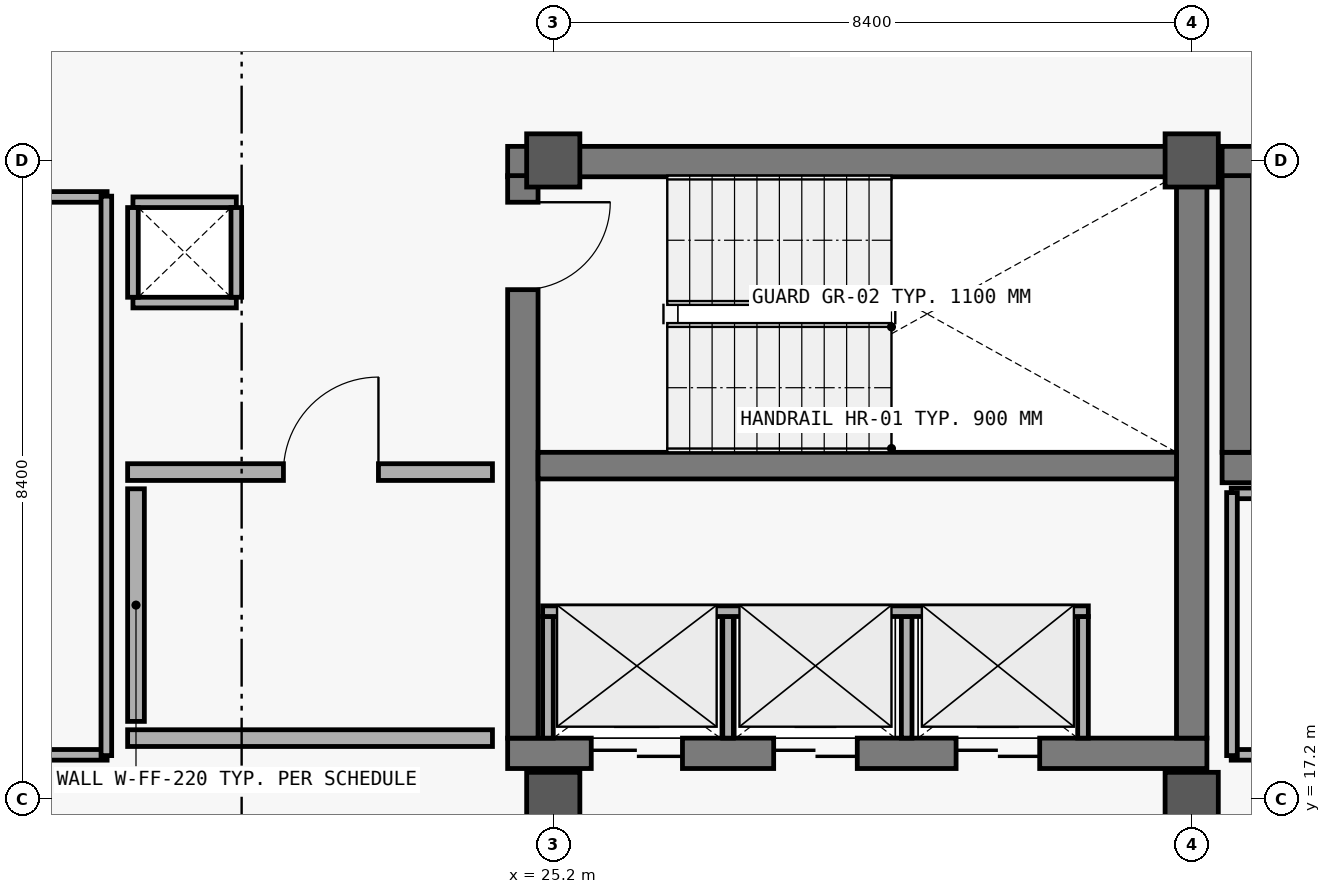
"""IFC4 building model, lengths in metres.
Left out: names, types, materials, properties, quantities, classifications, styles, units other than length and angle.
Written with IfcOpenShell. Run it as: python <this file> out.ifc"""

import sys

from ifc_helpers import new_model, si_unit, direction, frame, frame_2d, origin, origin_2d, place, context, subcontext, project, spatial, rectangle, extrude, element, fill, save


model = new_model("IFC4")
c1 = context("Model", 3, precision=1e-05, world=origin(), true_north=direction((0.0, 1.0)))
c2 = subcontext(c1, "Body", "Model", "MODEL_VIEW")
j1 = project(units=[si_unit("LENGTHUNIT", "METRE"), si_unit("PLANEANGLEUNIT", "RADIAN")], contexts=[c1])
p1 = place(None, origin())
s1 = spatial("IfcSite", under=j1, at=p1, CompositionType="ELEMENT")
p2 = place(p1, origin())
s2 = spatial("IfcBuilding", under=s1, at=p2, CompositionType="ELEMENT")
p3 = place(p2, frame((0.0, 0.0, 30.0)))
s3 = spatial("IfcBuildingStorey", under=s2, at=p3, CompositionType="ELEMENT", Elevation=30.0)
for number, where, z_axis, x_axis in (
    (1, (25.2, 17.2, 0.0), (0.0, 0.0, 1.0), (1.0, 0.0, 0.0)),
    (2, (25.2, 25.6, 0.0), (0.0, 0.0, 1.0), (1.0, 0.0, 0.0)),
    (3, (33.6, 17.2, 0.0), (0.0, 0.0, 1.0), (1.0, 0.0, 0.0)),
    (4, (33.6, 25.6, 0.0), (0.0, 0.0, 1.0), (1.0, 0.0, 0.0)),
):
    element("IfcColumn", number, at=place(p3, frame(where, z_axis=z_axis, x_axis=x_axis)), inside=s3, PredefinedType="COLUMN", context=c2, shape_type="SweptSolid", body=[
        extrude(rectangle(XDim=0.7, YDim=0.7, at=origin_2d()), origin(), (0.0, 0.0, 1.0), 3.6),
    ])
p4 = place(p3, frame((24.6, 17.8, 0.0), z_axis=(0.0, 0.0, 1.0), x_axis=(1.0, 0.0, 0.0)))
e5 = element("IfcWall", 5, at=p4, inside=s3, PredefinedType="SHEAR", context=c2, shape_type="SweptSolid", body=[
    extrude(rectangle(XDim=9.2, YDim=0.4, at=frame_2d((4.6, 0.0))), origin(), (0.0, 0.0, 1.0), 3.32),
])
p5 = place(p4, frame((1.1, 0.0, 0.0)))
e6 = element("IfcOpeningElement", 6, at=p5, cuts=e5, PredefinedType="OPENING", context=c2, shape_type="SweptSolid", body=[
    extrude(rectangle(XDim=1.2, YDim=2.2, at=frame_2d((0.6, 1.1))), frame((0.0, 0.21, 0.0), z_axis=(0.0, -1.0, 0.0), x_axis=(1.0, 0.0, 0.0)), (0.0, 0.0, 1.0), 0.42),
])
p6 = place(p4, frame((3.5, 0.0, 0.0)))
e7 = element("IfcOpeningElement", 7, at=p6, cuts=e5, PredefinedType="OPENING", context=c2, shape_type="SweptSolid", body=[
    extrude(rectangle(XDim=1.1, YDim=2.2, at=frame_2d((0.55, 1.1))), frame((0.0, 0.21, 0.0), z_axis=(0.0, -1.0, 0.0), x_axis=(1.0, 0.0, 0.0)), (0.0, 0.0, 1.0), 0.42),
])
p7 = place(p4, frame((5.9, 0.0, 0.0)))
e8 = element("IfcOpeningElement", 8, at=p7, cuts=e5, PredefinedType="OPENING", context=c2, shape_type="SweptSolid", body=[
    extrude(rectangle(XDim=1.1, YDim=2.2, at=frame_2d((0.55, 1.1))), frame((0.0, 0.21, 0.0), z_axis=(0.0, -1.0, 0.0), x_axis=(1.0, 0.0, 0.0)), (0.0, 0.0, 1.0), 0.42),
])
p8 = place(p3, frame((33.8, 25.585, 0.0), z_axis=(0.0, 0.0, 1.0), x_axis=(-1.0, 0.0, 0.0)))
e9 = element("IfcWall", 9, at=p8, inside=s3, PredefinedType="SHEAR", context=c2, shape_type="SweptSolid", body=[
    extrude(rectangle(XDim=9.2, YDim=0.4, at=frame_2d((4.6, 0.0))), origin(), (0.0, 0.0, 1.0), 3.32),
])
p9 = place(p3, frame((24.8, 25.4, 0.0), z_axis=(0.0, 0.0, 1.0), x_axis=(0.0, -1.0, 0.0)))
e10 = element("IfcWall", 10, at=p9, inside=s3, PredefinedType="SHEAR", context=c2, shape_type="SweptSolid", body=[
    extrude(rectangle(XDim=7.4, YDim=0.4, at=frame_2d((3.7, 0.0))), origin(), (0.0, 0.0, 1.0), 3.32),
])
p10 = place(p9, frame((0.35, 0.0, 0.0)))
e11 = element("IfcOpeningElement", 11, at=p10, cuts=e10, PredefinedType="OPENING", context=c2, shape_type="SweptSolid", body=[
    extrude(rectangle(XDim=1.15, YDim=2.2, at=frame_2d((0.575, 1.1))), frame((0.0, 0.21, 0.0), z_axis=(0.0, -1.0, 0.0), x_axis=(1.0, 0.0, 0.0)), (0.0, 0.0, 1.0), 0.42),
])
p11 = place(p3, frame((33.6, 18.0, 0.0), z_axis=(0.0, 0.0, 1.0), x_axis=(0.0, 1.0, 0.0)))
e12 = element("IfcWall", 12, at=p11, inside=s3, PredefinedType="SHEAR", context=c2, shape_type="SweptSolid", body=[
    extrude(rectangle(XDim=7.4, YDim=0.4, at=frame_2d((3.7, 0.0))), origin(), (0.0, 0.0, 1.0), 3.32),
])
p12 = place(p3, frame((25.0, 21.585, 0.0), z_axis=(0.0, 0.0, 1.0), x_axis=(1.0, 0.0, 0.0)))
e13 = element("IfcWall", 13, at=p12, inside=s3, PredefinedType="SHEAR", context=c2, shape_type="SweptSolid", body=[
    extrude(rectangle(XDim=8.4, YDim=0.35, at=frame_2d((4.2, 0.0))), origin(), (0.0, 0.0, 1.0), 3.32),
])
for number, where, z_axis, x_axis in (
    (14, (25.13, 18.0, 0.0), (0.0, 0.0, 1.0), (0.0, 1.0, 0.0)),
    (15, (27.5, 18.0, 0.0), (0.0, 0.0, 1.0), (0.0, 1.0, 0.0)),
    (16, (29.85, 18.0, 0.0), (0.0, 0.0, 1.0), (0.0, 1.0, 0.0)),
    (17, (32.17, 18.0, 0.0), (0.0, 0.0, 1.0), (0.0, 1.0, 0.0)),
):
    element("IfcWall", number, at=place(p3, frame(where, z_axis=z_axis, x_axis=x_axis)), inside=s3, PredefinedType="PARTITIONING", context=c2, shape_type="SweptSolid", body=[
        extrude(rectangle(XDim=1.6, YDim=0.14, at=frame_2d((0.8, 0.0))), origin(), (0.0, 0.0, 1.0), 2.47),
    ])
p13 = place(p3, frame((25.06, 19.67, 0.0), z_axis=(0.0, 0.0, 1.0), x_axis=(1.0, 0.0, 0.0)))
e18 = element("IfcWall", 18, at=p13, inside=s3, PredefinedType="PARTITIONING", context=c2, shape_type="SweptSolid", body=[
    extrude(rectangle(XDim=7.18, YDim=0.14, at=frame_2d((3.59, 0.0))), origin(), (0.0, 0.0, 1.0), 2.47),
])
p14 = place(p3, frame((19.6, 18.0, 0.0), z_axis=(0.0, 0.0, 1.0), x_axis=(1.0, 0.0, 0.0)))
e19 = element("IfcWall", 19, at=p14, inside=s3, PredefinedType="SOLIDWALL", context=c2, shape_type="SweptSolid", body=[
    extrude(rectangle(XDim=4.8, YDim=0.22, at=frame_2d((2.4, 0.0))), origin(), (0.0, 0.0, 1.0), 2.47),
])
p15 = place(p3, frame((19.6, 21.5, 0.0), z_axis=(0.0, 0.0, 1.0), x_axis=(1.0, 0.0, 0.0)))
e20 = element("IfcWall", 20, at=p15, inside=s3, PredefinedType="SOLIDWALL", context=c2, shape_type="SweptSolid", body=[
    extrude(rectangle(XDim=4.8, YDim=0.22, at=frame_2d((2.4, 0.0))), origin(), (0.0, 0.0, 1.0), 2.47),
])
p16 = place(p15, frame((2.05, 0.0, 0.0)))
e21 = element("IfcOpeningElement", 21, at=p16, cuts=e20, PredefinedType="OPENING", context=c2, shape_type="SweptSolid", body=[
    extrude(rectangle(XDim=1.25, YDim=2.2, at=frame_2d((0.625, 1.1))), frame((0.0, 0.12, 0.0), z_axis=(0.0, -1.0, 0.0), x_axis=(1.0, 0.0, 0.0)), (0.0, 0.0, 1.0), 0.24),
])
p17 = place(p3, frame((19.71, 18.22, 0.0), z_axis=(0.0, 0.0, 1.0), x_axis=(0.0, 1.0, 0.0)))
e22 = element("IfcWall", 22, at=p17, inside=s3, PredefinedType="SOLIDWALL", context=c2, shape_type="SweptSolid", body=[
    extrude(rectangle(XDim=3.06, YDim=0.22, at=frame_2d((1.53, 0.0))), origin(), (0.0, 0.0, 1.0), 2.47),
])
for number, where, z_axis, x_axis in (
    (23, (34.0, 21.56, 0.0), (0.0, 0.0, 1.0), (1.0, 0.0, 0.0)),
    (24, (43.1, 25.585, 0.0), (0.0, 0.0, 1.0), (-1.0, 0.0, 0.0)),
):
    element("IfcWall", number, at=place(p3, frame(where, z_axis=z_axis, x_axis=x_axis)), inside=s3, PredefinedType="SHEAR", context=c2, shape_type="SweptSolid", body=[
        extrude(rectangle(XDim=9.1, YDim=0.4, at=frame_2d((4.55, 0.0))), origin(), (0.0, 0.0, 1.0), 3.32),
    ])
p18 = place(p3, frame((34.2, 25.4, 0.0), z_axis=(0.0, 0.0, 1.0), x_axis=(0.0, -1.0, 0.0)))
e25 = element("IfcWall", 25, at=p18, inside=s3, PredefinedType="SHEAR", context=c2, shape_type="SweptSolid", body=[
    extrude(rectangle(XDim=3.64, YDim=0.4, at=frame_2d((1.82, 0.0))), origin(), (0.0, 0.0, 1.0), 3.32),
])
p19 = place(p3, frame((8.68, 17.78, 0.0), z_axis=(0.0, 0.0, 1.0), x_axis=(1.0, 0.0, 0.0)))
e26 = element("IfcWall", 26, at=p19, inside=s3, PredefinedType="PARTITIONING", context=c2, shape_type="SweptSolid", body=[
    extrude(rectangle(XDim=10.65, YDim=0.14, at=frame_2d((5.325, 0.0))), origin(), (0.0, 0.0, 1.0), 2.48),
])
p20 = place(p19, frame((3.97, 0.0, 0.0)))
e27 = element("IfcOpeningElement", 27, at=p20, cuts=e26, PredefinedType="OPENING", context=c2, shape_type="SweptSolid", body=[
    extrude(rectangle(XDim=1.08, YDim=2.25, at=frame_2d((0.54, 1.125))), frame((0.0, 0.08, 0.0), z_axis=(0.0, -1.0, 0.0), x_axis=(1.0, 0.0, 0.0)), (0.0, 0.0, 1.0), 0.16),
])
for number, where, z_axis, x_axis in (
    (28, (34.12, 17.78, 0.0), (0.0, 0.0, 1.0), (1.0, 0.0, 0.0)),
    (29, (34.12, 21.22, 0.0), (0.0, 0.0, 1.0), (1.0, 0.0, 0.0)),
):
    element("IfcWall", number, at=place(p3, frame(where, z_axis=z_axis, x_axis=x_axis)), inside=s3, PredefinedType="PARTITIONING", context=c2, shape_type="SweptSolid", body=[
        extrude(rectangle(XDim=10.76, YDim=0.14, at=frame_2d((5.38, 0.0))), origin(), (0.0, 0.0, 1.0), 2.48),
    ])
p21 = place(p3, frame((34.13, 17.77, 0.0), z_axis=(0.0, 0.0, 1.0), x_axis=(0.0, 1.0, 0.0)))
e30 = element("IfcWall", 30, at=p21, inside=s3, PredefinedType="PARTITIONING", context=c2, shape_type="SweptSolid", body=[
    extrude(rectangle(XDim=3.46, YDim=0.14, at=frame_2d((1.73, 0.0))), origin(), (0.0, 0.0, 1.0), 2.48),
])
p22 = place(p3, frame((8.68, 25.12, 0.0), z_axis=(0.0, 0.0, 1.0), x_axis=(1.0, 0.0, 0.0)))
e31 = element("IfcWall", 31, at=p22, inside=s3, PredefinedType="PARTITIONING", context=c2, shape_type="SweptSolid", body=[
    extrude(rectangle(XDim=10.65, YDim=0.14, at=frame_2d((5.325, 0.0))), origin(), (0.0, 0.0, 1.0), 2.48),
])
p23 = place(p3, frame((19.32, 17.77, 0.0), z_axis=(0.0, 0.0, 1.0), x_axis=(0.0, 1.0, 0.0)))
e32 = element("IfcWall", 32, at=p23, inside=s3, PredefinedType="PARTITIONING", context=c2, shape_type="SweptSolid", body=[
    extrude(rectangle(XDim=7.36, YDim=0.14, at=frame_2d((3.68, 0.0))), origin(), (0.0, 0.0, 1.0), 2.48),
])
for number, where, z_axis, x_axis in (
    (33, (19.67, 23.73, 0.0), (0.0, 0.0, 1.0), (1.0, 0.0, 0.0)),
    (34, (21.03, 25.05, 0.0), (0.0, 0.0, 1.0), (-1.0, 0.0, 0.0)),
):
    element("IfcWall", number, at=place(p3, frame(where, z_axis=z_axis, x_axis=x_axis)), inside=s3, PredefinedType="PARTITIONING", context=c2, shape_type="SweptSolid", body=[
        extrude(rectangle(XDim=1.36, YDim=0.14, at=frame_2d((0.68, 0.0))), origin(), (0.0, 0.0, 1.0), 2.44),
    ])
for number, where, z_axis, x_axis in (
    (35, (19.67, 24.98, 0.0), (0.0, 0.0, 1.0), (0.0, -1.0, 0.0)),
    (36, (21.03, 23.8, 0.0), (0.0, 0.0, 1.0), (0.0, 1.0, 0.0)),
):
    element("IfcWall", number, at=place(p3, frame(where, z_axis=z_axis, x_axis=x_axis)), inside=s3, PredefinedType="PARTITIONING", context=c2, shape_type="SweptSolid", body=[
        extrude(rectangle(XDim=1.18, YDim=0.14, at=frame_2d((0.59, 0.0))), origin(), (0.0, 0.0, 1.0), 2.44),
    ])
p24 = place(p10, origin())
e37 = element("IfcDoor", 37, at=p24, inside=s3, OperationType="SINGLE_SWING_LEFT", PredefinedType="DOOR", context=c2, shape_type="SweptSolid", body=[
    extrude(rectangle(XDim=1.15, YDim=2.2, at=frame_2d((0.575, 1.1))), frame((0.0, 0.025, 0.0), z_axis=(0.0, -1.0, 0.0), x_axis=(1.0, 0.0, 0.0)), (0.0, 0.0, 1.0), 0.05),
])
fill(e11, e37)
p25 = place(p5, origin())
e38 = element("IfcDoor", 38, at=p25, inside=s3, OperationType="DOUBLE_DOOR_SLIDING", PredefinedType="DOOR", context=c2, shape_type="SweptSolid", body=[
    extrude(rectangle(XDim=1.2, YDim=2.2, at=frame_2d((0.6, 1.1))), frame((0.0, 0.025, 0.0), z_axis=(0.0, -1.0, 0.0), x_axis=(1.0, 0.0, 0.0)), (0.0, 0.0, 1.0), 0.05),
])
fill(e6, e38)
p26 = place(p6, origin())
e39 = element("IfcDoor", 39, at=p26, inside=s3, OperationType="DOUBLE_DOOR_SLIDING", PredefinedType="DOOR", context=c2, shape_type="SweptSolid", body=[
    extrude(rectangle(XDim=1.1, YDim=2.2, at=frame_2d((0.55, 1.1))), frame((0.0, 0.025, 0.0), z_axis=(0.0, -1.0, 0.0), x_axis=(1.0, 0.0, 0.0)), (0.0, 0.0, 1.0), 0.05),
])
fill(e7, e39)
p27 = place(p7, origin())
e40 = element("IfcDoor", 40, at=p27, inside=s3, OperationType="DOUBLE_DOOR_SLIDING", PredefinedType="DOOR", context=c2, shape_type="SweptSolid", body=[
    extrude(rectangle(XDim=1.1, YDim=2.2, at=frame_2d((0.55, 1.1))), frame((0.0, 0.025, 0.0), z_axis=(0.0, -1.0, 0.0), x_axis=(1.0, 0.0, 0.0)), (0.0, 0.0, 1.0), 0.05),
])
fill(e8, e40)
p28 = place(p16, origin())
e41 = element("IfcDoor", 41, at=p28, inside=s3, OperationType="SINGLE_SWING_RIGHT", PredefinedType="DOOR", context=c2, shape_type="SweptSolid", body=[
    extrude(rectangle(XDim=1.25, YDim=2.2, at=frame_2d((0.625, 1.1))), frame((0.0, 0.025, 0.0), z_axis=(0.0, -1.0, 0.0), x_axis=(1.0, 0.0, 0.0)), (0.0, 0.0, 1.0), 0.05),
])
fill(e21, e41)
save(model, sys.argv[1])
